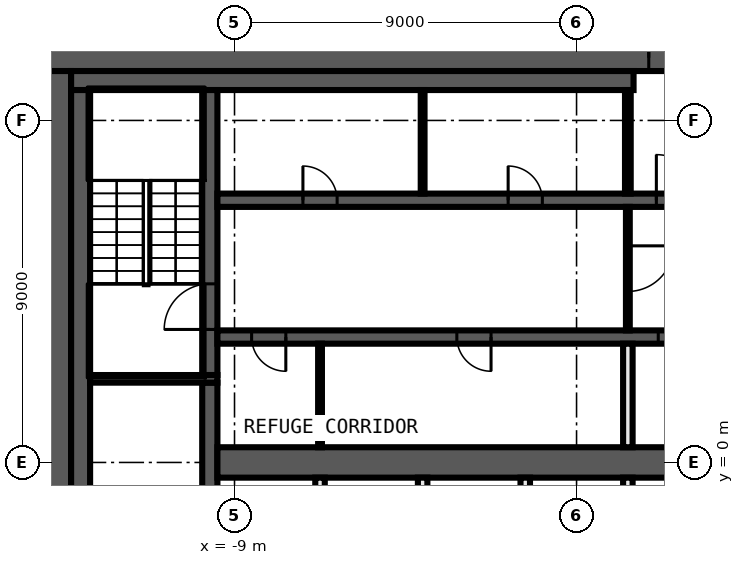
"""IFC4 building model, lengths in metres.
Left out: names, types, materials, properties, quantities, classifications, styles, units other than length and angle.
Written with IfcOpenShell. Run it as: python <this file> out.ifc"""

import sys

from ifc_helpers import new_model, si_unit, direction, frame, frame_2d, origin, place, context, subcontext, project, spatial, rectangle, extrude, element, fill, save


model = new_model("IFC4")
c1 = context("Model", 3, precision=1e-05, world=origin(), true_north=direction((0.0, 1.0)))
c2 = subcontext(c1, "Body", "Model", "MODEL_VIEW")
j1 = project(units=[si_unit("LENGTHUNIT", "METRE"), si_unit("PLANEANGLEUNIT", "RADIAN")], contexts=[c1])
p1 = place(None, origin())
s1 = spatial("IfcSite", under=j1, at=p1, CompositionType="ELEMENT")
p2 = place(p1, origin())
s2 = spatial("IfcBuilding", under=s1, at=p2, CompositionType="ELEMENT")
p3 = place(p2, frame((0.0, 0.0, 283.2)))
s3 = spatial("IfcBuildingStorey", under=s2, at=p3, CompositionType="ELEMENT", Elevation=283.2)
p4 = place(p3, frame((-14.0, 10.65, 0.0), z_axis=(0.0, 0.0, 1.0), x_axis=(1.0, 0.0, 0.0)))
e1 = element("IfcWall", 1, at=p4, inside=s3, PredefinedType="SHEAR", context=c2, shape_type="SweptSolid", body=[
    extrude(rectangle(XDim=28.0, YDim=0.7, at=frame_2d((14.0, 0.0))), origin(), (0.0, 0.0, 1.0), 5.55),
])
p5 = place(p4, frame((15.9, 0.0, 0.0)))
e2 = element("IfcOpeningElement", 2, at=p5, cuts=e1, PredefinedType="OPENING", context=c2, shape_type="SweptSolid", body=[
    extrude(rectangle(XDim=1.6, YDim=2.1, at=frame_2d((0.8, 1.05))), frame((0.0, 0.36, 0.0), z_axis=(0.0, -1.0, 0.0), x_axis=(1.0, 0.0, 0.0)), (0.0, 0.0, 1.0), 0.72),
])
p6 = place(p3, frame((-13.65, -10.3, 0.0), z_axis=(0.0, 0.0, 1.0), x_axis=(0.0, 1.0, 0.0)))
e3 = element("IfcWall", 3, at=p6, inside=s3, PredefinedType="SHEAR", context=c2, shape_type="SweptSolid", body=[
    extrude(rectangle(XDim=20.6, YDim=0.7, at=frame_2d((10.3, 0.0))), origin(), (0.0, 0.0, 1.0), 5.55),
])
p7 = place(p3, frame((-13.3, 10.05, 0.0), z_axis=(0.0, 0.0, 1.0), x_axis=(1.0, 0.0, 0.0)))
e4 = element("IfcWall", 4, at=p7, inside=s3, PredefinedType="SHEAR", context=c2, shape_type="SweptSolid", body=[
    extrude(rectangle(XDim=14.8, YDim=0.5, at=frame_2d((7.4, 0.0))), origin(), (0.0, 0.0, 1.0), 5.55),
])
p8 = place(p3, frame((-13.05, -9.8, 0.0), z_axis=(0.0, 0.0, 1.0), x_axis=(0.0, 1.0, 0.0)))
e5 = element("IfcWall", 5, at=p8, inside=s3, PredefinedType="SHEAR", context=c2, shape_type="SweptSolid", body=[
    extrude(rectangle(XDim=19.6, YDim=0.5, at=frame_2d((9.8, 0.0))), origin(), (0.0, 0.0, 1.0), 5.55),
])
p9 = place(p3, frame((-9.65, -2.1, 0.0), z_axis=(0.0, 0.0, 1.0), x_axis=(0.0, 1.0, 0.0)))
e6 = element("IfcWall", 6, at=p9, inside=s3, PredefinedType="SHEAR", context=c2, shape_type="SweptSolid", body=[
    extrude(rectangle(XDim=4.2, YDim=0.4, at=frame_2d((2.1, 0.0))), origin(), (0.0, 0.0, 1.0), 5.55),
])
p10 = place(p3, frame((-9.65, 2.3, 0.0), z_axis=(0.0, 0.0, 1.0), x_axis=(0.0, 1.0, 0.0)))
e7 = element("IfcWall", 7, at=p10, inside=s3, PredefinedType="SHEAR", context=c2, shape_type="SweptSolid", body=[
    extrude(rectangle(XDim=7.5, YDim=0.4, at=frame_2d((3.75, 0.0))), origin(), (0.0, 0.0, 1.0), 5.55),
])
p11 = place(p10, frame((1.2, 0.0, 0.0)))
e8 = element("IfcOpeningElement", 8, at=p11, cuts=e7, PredefinedType="OPENING", context=c2, shape_type="SweptSolid", body=[
    extrude(rectangle(XDim=1.2, YDim=2.1, at=frame_2d((0.6, 1.05))), frame((0.0, 0.21, 0.0), z_axis=(0.0, -1.0, 0.0), x_axis=(1.0, 0.0, 0.0)), (0.0, 0.0, 1.0), 0.42),
])
p12 = place(p3, frame((-9.45, 2.2, 0.0), z_axis=(0.0, 0.0, 1.0), x_axis=(-1.0, 0.0, 0.0)))
e9 = element("IfcWall", 9, at=p12, inside=s3, PredefinedType="SHEAR", context=c2, shape_type="SweptSolid", body=[
    extrude(rectangle(XDim=3.35, YDim=0.2, at=frame_2d((1.675, 0.0))), origin(), (0.0, 0.0, 1.0), 5.55),
])
p13 = place(p3, frame((-9.45, 6.9, 0.0), z_axis=(0.0, 0.0, 1.0), x_axis=(1.0, 0.0, 0.0)))
e10 = element("IfcWall", 10, at=p13, inside=s3, PredefinedType="SHEAR", context=c2, shape_type="SweptSolid", body=[
    extrude(rectangle(XDim=18.9, YDim=0.35, at=frame_2d((9.45, 0.0))), origin(), (0.0, 0.0, 1.0), 5.55),
])
p14 = place(p13, frame((11.55, 0.0, 0.0)))
e11 = element("IfcOpeningElement", 11, at=p14, cuts=e10, PredefinedType="OPENING", context=c2, shape_type="SweptSolid", body=[
    extrude(rectangle(XDim=1.2, YDim=2.1, at=frame_2d((0.6, 1.05))), frame((0.0, 0.185, 0.0), z_axis=(0.0, -1.0, 0.0), x_axis=(1.0, 0.0, 0.0)), (0.0, 0.0, 1.0), 0.37),
])
p15 = place(p13, frame((14.3, 0.0, 0.0)))
e12 = element("IfcOpeningElement", 12, at=p15, cuts=e10, PredefinedType="OPENING", context=c2, shape_type="SweptSolid", body=[
    extrude(rectangle(XDim=1.1, YDim=2.1, at=frame_2d((0.55, 1.05))), frame((0.0, 0.185, 0.0), z_axis=(0.0, -1.0, 0.0), x_axis=(1.0, 0.0, 0.0)), (0.0, 0.0, 1.0), 0.37),
])
p16 = place(p13, frame((17.0, 0.0, 0.0)))
e13 = element("IfcOpeningElement", 13, at=p16, cuts=e10, PredefinedType="OPENING", context=c2, shape_type="SweptSolid", body=[
    extrude(rectangle(XDim=1.1, YDim=2.1, at=frame_2d((0.55, 1.05))), frame((0.0, 0.185, 0.0), z_axis=(0.0, -1.0, 0.0), x_axis=(1.0, 0.0, 0.0)), (0.0, 0.0, 1.0), 0.37),
])
p17 = place(p13, frame((2.25, 0.0, 0.0)))
e14 = element("IfcOpeningElement", 14, at=p17, cuts=e10, PredefinedType="OPENING", context=c2, shape_type="SweptSolid", body=[
    extrude(rectangle(XDim=0.9, YDim=2.1, at=frame_2d((0.45, 1.05))), frame((0.0, 0.185, 0.0), z_axis=(0.0, -1.0, 0.0), x_axis=(1.0, 0.0, 0.0)), (0.0, 0.0, 1.0), 0.37),
])
p18 = place(p13, frame((7.65, 0.0, 0.0)))
e15 = element("IfcOpeningElement", 15, at=p18, cuts=e10, PredefinedType="OPENING", context=c2, shape_type="SweptSolid", body=[
    extrude(rectangle(XDim=0.9, YDim=2.1, at=frame_2d((0.45, 1.05))), frame((0.0, 0.185, 0.0), z_axis=(0.0, -1.0, 0.0), x_axis=(1.0, 0.0, 0.0)), (0.0, 0.0, 1.0), 0.37),
])
p19 = place(p3, frame((9.45, 3.3, 0.0), z_axis=(0.0, 0.0, 1.0), x_axis=(-1.0, 0.0, 0.0)))
e16 = element("IfcWall", 16, at=p19, inside=s3, PredefinedType="SHEAR", context=c2, shape_type="SweptSolid", body=[
    extrude(rectangle(XDim=18.9, YDim=0.35, at=frame_2d((9.45, 0.0))), origin(), (0.0, 0.0, 1.0), 5.55),
])
p20 = place(p19, frame((6.2, 0.0, 0.0)))
e17 = element("IfcOpeningElement", 17, at=p20, cuts=e16, PredefinedType="OPENING", context=c2, shape_type="SweptSolid", body=[
    extrude(rectangle(XDim=1.1, YDim=2.1, at=frame_2d((0.55, 1.05))), frame((0.0, 0.185, 0.0), z_axis=(0.0, -1.0, 0.0), x_axis=(1.0, 0.0, 0.0)), (0.0, 0.0, 1.0), 0.37),
])
p21 = place(p19, frame((3.5, 0.0, 0.0)))
e18 = element("IfcOpeningElement", 18, at=p21, cuts=e16, PredefinedType="OPENING", context=c2, shape_type="SweptSolid", body=[
    extrude(rectangle(XDim=1.1, YDim=2.1, at=frame_2d((0.55, 1.05))), frame((0.0, 0.185, 0.0), z_axis=(0.0, -1.0, 0.0), x_axis=(1.0, 0.0, 0.0)), (0.0, 0.0, 1.0), 0.37),
])
p22 = place(p19, frame((0.9, 0.0, 0.0)))
e19 = element("IfcOpeningElement", 19, at=p22, cuts=e16, PredefinedType="OPENING", context=c2, shape_type="SweptSolid", body=[
    extrude(rectangle(XDim=0.9, YDim=2.1, at=frame_2d((0.45, 1.05))), frame((0.0, 0.185, 0.0), z_axis=(0.0, -1.0, 0.0), x_axis=(1.0, 0.0, 0.0)), (0.0, 0.0, 1.0), 0.37),
])
p23 = place(p19, frame((17.1, 0.0, 0.0)))
e20 = element("IfcOpeningElement", 20, at=p23, cuts=e16, PredefinedType="OPENING", context=c2, shape_type="SweptSolid", body=[
    extrude(rectangle(XDim=0.9, YDim=2.1, at=frame_2d((0.45, 1.05))), frame((0.0, 0.185, 0.0), z_axis=(0.0, -1.0, 0.0), x_axis=(1.0, 0.0, 0.0)), (0.0, 0.0, 1.0), 0.37),
])
p24 = place(p19, frame((11.7, 0.0, 0.0)))
e21 = element("IfcOpeningElement", 21, at=p24, cuts=e16, PredefinedType="OPENING", context=c2, shape_type="SweptSolid", body=[
    extrude(rectangle(XDim=0.9, YDim=2.1, at=frame_2d((0.45, 1.05))), frame((0.0, 0.185, 0.0), z_axis=(0.0, -1.0, 0.0), x_axis=(1.0, 0.0, 0.0)), (0.0, 0.0, 1.0), 0.37),
])
p25 = place(p3, frame((-9.45, 0.0, 0.0), z_axis=(0.0, 0.0, 1.0), x_axis=(1.0, 0.0, 0.0)))
e22 = element("IfcWall", 22, at=p25, inside=s3, PredefinedType="SHEAR", context=c2, shape_type="SweptSolid", body=[
    extrude(rectangle(XDim=18.9, YDim=0.8, at=frame_2d((9.45, 0.0))), origin(), (0.0, 0.0, 1.0), 5.55),
])
p26 = place(p3, frame((1.35, 7.075, 0.0), z_axis=(0.0, 0.0, 1.0), x_axis=(0.0, 1.0, 0.0)))
e23 = element("IfcWall", 23, at=p26, inside=s3, PredefinedType="PARTITIONING", context=c2, shape_type="SweptSolid", body=[
    extrude(rectangle(XDim=2.725, YDim=0.15, at=frame_2d((1.363, 0.0))), origin(), (0.0, 0.0, 1.0), 5.55),
])
p27 = place(p3, frame((1.35, 6.725, 0.0), z_axis=(0.0, 0.0, 1.0), x_axis=(0.0, -1.0, 0.0)))
e24 = element("IfcWall", 24, at=p27, inside=s3, PredefinedType="PARTITIONING", context=c2, shape_type="SweptSolid", body=[
    extrude(rectangle(XDim=3.25, YDim=0.1, at=frame_2d((1.625, 0.0))), origin(), (0.0, 0.0, 1.0), 5.55),
])
p28 = place(p27, frame((1.025, 0.0, 0.0)))
e25 = element("IfcOpeningElement", 25, at=p28, cuts=e24, PredefinedType="OPENING", context=c2, shape_type="SweptSolid", body=[
    extrude(rectangle(XDim=1.2, YDim=2.1, at=frame_2d((0.6, 1.05))), frame((0.0, 0.06, 0.0), z_axis=(0.0, -1.0, 0.0), x_axis=(1.0, 0.0, 0.0)), (0.0, 0.0, 1.0), 0.12),
])
for number, where, z_axis, x_axis in (
    (26, (1.35, -3.125, 0.0), (0.0, 0.0, 1.0), (0.0, 1.0, 0.0)),
    (27, (1.35, 0.4, 0.0), (0.0, 0.0, 1.0), (0.0, 1.0, 0.0)),
    (28, (-1.35, -3.125, 0.0), (0.0, 0.0, 1.0), (0.0, 1.0, 0.0)),
):
    element("IfcWall", number, at=place(p3, frame(where, z_axis=z_axis, x_axis=x_axis)), inside=s3, PredefinedType="SOLIDWALL", context=c2, shape_type="SweptSolid", body=[
        extrude(rectangle(XDim=2.725, YDim=0.25, at=frame_2d((1.363, 0.0))), origin(), (0.0, 0.0, 1.0), 5.55),
    ])
p29 = place(p3, frame((-4.05, 7.075, 0.0), z_axis=(0.0, 0.0, 1.0), x_axis=(0.0, 1.0, 0.0)))
e29 = element("IfcWall", 29, at=p29, inside=s3, PredefinedType="PARTITIONING", context=c2, shape_type="SweptSolid", body=[
    extrude(rectangle(XDim=2.725, YDim=0.1, at=frame_2d((1.363, 0.0))), origin(), (0.0, 0.0, 1.0), 5.55),
])
p30 = place(p3, frame((-4.05, -3.125, 0.0), z_axis=(0.0, 0.0, 1.0), x_axis=(0.0, 1.0, 0.0)))
e30 = element("IfcWall", 30, at=p30, inside=s3, PredefinedType="SOLIDWALL", context=c2, shape_type="SweptSolid", body=[
    extrude(rectangle(XDim=2.725, YDim=0.25, at=frame_2d((1.363, 0.0))), origin(), (0.0, 0.0, 1.0), 5.55),
])
p31 = place(p3, frame((-6.75, 0.4, 0.0), z_axis=(0.0, 0.0, 1.0), x_axis=(0.0, 1.0, 0.0)))
e31 = element("IfcWall", 31, at=p31, inside=s3, PredefinedType="PARTITIONING", context=c2, shape_type="SweptSolid", body=[
    extrude(rectangle(XDim=2.725, YDim=0.1, at=frame_2d((1.363, 0.0))), origin(), (0.0, 0.0, 1.0), 5.55),
])
p32 = place(p3, frame((-6.75, -3.125, 0.0), z_axis=(0.0, 0.0, 1.0), x_axis=(0.0, 1.0, 0.0)))
e32 = element("IfcWall", 32, at=p32, inside=s3, PredefinedType="SOLIDWALL", context=c2, shape_type="SweptSolid", body=[
    extrude(rectangle(XDim=2.725, YDim=0.25, at=frame_2d((1.363, 0.0))), origin(), (0.0, 0.0, 1.0), 5.55),
])
p33 = place(p5, origin())
e33 = element("IfcDoor", 33, at=p33, inside=s3, OperationType="DOUBLE_DOOR_SINGLE_SWING", PredefinedType="DOOR", context=c2, shape_type="SweptSolid", body=[
    extrude(rectangle(XDim=1.6, YDim=2.1, at=frame_2d((0.8, 1.05))), frame((0.0, 0.025, 0.0), z_axis=(0.0, -1.0, 0.0), x_axis=(1.0, 0.0, 0.0)), (0.0, 0.0, 1.0), 0.05),
])
fill(e2, e33)
p34 = place(p14, origin())
e34 = element("IfcDoor", 34, at=p34, inside=s3, OperationType="SINGLE_SWING_LEFT", PredefinedType="DOOR", context=c2, shape_type="SweptSolid", body=[
    extrude(rectangle(XDim=1.2, YDim=2.1, at=frame_2d((0.6, 1.05))), frame((0.0, 0.025, 0.0), z_axis=(0.0, -1.0, 0.0), x_axis=(1.0, 0.0, 0.0)), (0.0, 0.0, 1.0), 0.05),
])
fill(e11, e34)
p35 = place(p20, origin())
e35 = element("IfcDoor", 35, at=p35, inside=s3, OperationType="DOUBLE_DOOR_SLIDING", PredefinedType="DOOR", context=c2, shape_type="SweptSolid", body=[
    extrude(rectangle(XDim=1.1, YDim=2.1, at=frame_2d((0.55, 1.05))), frame((0.0, 0.025, 0.0), z_axis=(0.0, -1.0, 0.0), x_axis=(1.0, 0.0, 0.0)), (0.0, 0.0, 1.0), 0.05),
])
fill(e17, e35)
p36 = place(p17, origin())
e36 = element("IfcDoor", 36, at=p36, inside=s3, OperationType="SINGLE_SWING_RIGHT", PredefinedType="DOOR", context=c2, shape_type="SweptSolid", body=[
    extrude(rectangle(XDim=0.9, YDim=2.1, at=frame_2d((0.45, 1.05))), frame((0.0, 0.025, 0.0), z_axis=(0.0, -1.0, 0.0), x_axis=(1.0, 0.0, 0.0)), (0.0, 0.0, 1.0), 0.05),
])
fill(e14, e36)
p37 = place(p18, origin())
e37 = element("IfcDoor", 37, at=p37, inside=s3, OperationType="SINGLE_SWING_LEFT", PredefinedType="DOOR", context=c2, shape_type="SweptSolid", body=[
    extrude(rectangle(XDim=0.9, YDim=2.1, at=frame_2d((0.45, 1.05))), frame((0.0, 0.025, 0.0), z_axis=(0.0, -1.0, 0.0), x_axis=(1.0, 0.0, 0.0)), (0.0, 0.0, 1.0), 0.05),
])
fill(e15, e37)
p38 = place(p23, origin())
e38 = element("IfcDoor", 38, at=p38, inside=s3, OperationType="SINGLE_SWING_RIGHT", PredefinedType="DOOR", context=c2, shape_type="SweptSolid", body=[
    extrude(rectangle(XDim=0.9, YDim=2.1, at=frame_2d((0.45, 1.05))), frame((0.0, 0.025, 0.0), z_axis=(0.0, -1.0, 0.0), x_axis=(1.0, 0.0, 0.0)), (0.0, 0.0, 1.0), 0.05),
])
fill(e20, e38)
p39 = place(p24, origin())
e39 = element("IfcDoor", 39, at=p39, inside=s3, OperationType="SINGLE_SWING_LEFT", PredefinedType="DOOR", context=c2, shape_type="SweptSolid", body=[
    extrude(rectangle(XDim=0.9, YDim=2.1, at=frame_2d((0.45, 1.05))), frame((0.0, 0.025, 0.0), z_axis=(0.0, -1.0, 0.0), x_axis=(1.0, 0.0, 0.0)), (0.0, 0.0, 1.0), 0.05),
])
fill(e21, e39)
p40 = place(p11, origin())
e40 = element("IfcDoor", 40, at=p40, inside=s3, OperationType="SINGLE_SWING_RIGHT", PredefinedType="DOOR", context=c2, shape_type="SweptSolid", body=[
    extrude(rectangle(XDim=1.2, YDim=2.1, at=frame_2d((0.6, 1.05))), frame((0.0, 0.025, 0.0), z_axis=(0.0, -1.0, 0.0), x_axis=(1.0, 0.0, 0.0)), (0.0, 0.0, 1.0), 0.05),
])
fill(e8, e40)
p41 = place(p28, origin())
e41 = element("IfcDoor", 41, at=p41, inside=s3, OperationType="SINGLE_SWING_LEFT", PredefinedType="DOOR", context=c2, shape_type="SweptSolid", body=[
    extrude(rectangle(XDim=1.2, YDim=2.1, at=frame_2d((0.6, 1.05))), frame((0.0, 0.025, 0.0), z_axis=(0.0, -1.0, 0.0), x_axis=(1.0, 0.0, 0.0)), (0.0, 0.0, 1.0), 0.05),
])
fill(e25, e41)
save(model, sys.argv[1])
